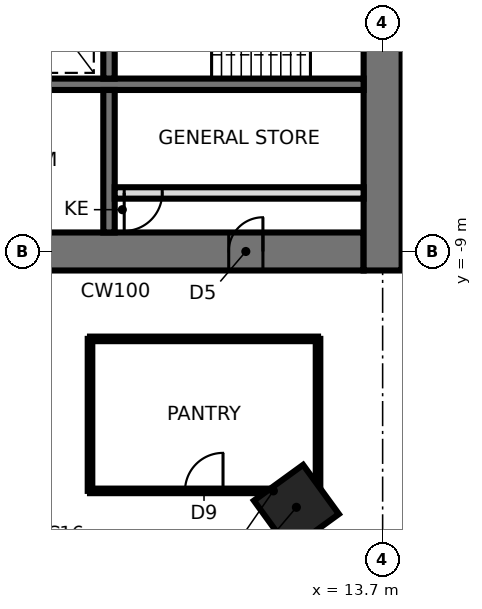
"""IFC4 building model, lengths in metres.
Left out: names, types, materials, properties, quantities, classifications, styles, units other than length and angle.
Written with IfcOpenShell. Run it as: python <this file> out.ifc"""

import sys

from ifc_helpers import new_model, si_unit, direction, frame, frame_2d, origin, origin_2d, place, context, subcontext, project, spatial, rectangle, extrude, element, fill, save


model = new_model("IFC4")
c1 = context("Model", 3, precision=1e-05, world=origin(), true_north=direction((0.0, 1.0)))
c2 = subcontext(c1, "Body", "Model", "MODEL_VIEW")
j1 = project(units=[si_unit("LENGTHUNIT", "METRE"), si_unit("PLANEANGLEUNIT", "RADIAN")], contexts=[c1])
p1 = place(None, origin())
s1 = spatial("IfcSite", under=j1, at=p1, CompositionType="ELEMENT")
p2 = place(p1, origin())
s2 = spatial("IfcBuilding", under=s1, at=p2, CompositionType="ELEMENT")
p3 = place(p2, frame((0.0, 0.0, 135.3)))
s3 = spatial("IfcBuildingStorey", under=s2, at=p3, CompositionType="ELEMENT", Elevation=135.3)
p4 = place(p3, frame((11.43, -15.733, 0.0), z_axis=(0.0, 0.0, 1.0), x_axis=(0.587785252292, -0.809016994375, 0.0)))
e1 = element("IfcColumn", 1, at=p4, inside=s3, PredefinedType="COLUMN", context=c2, shape_type="SweptSolid", body=[
    extrude(rectangle(XDim=1.6, YDim=1.6, at=origin_2d()), origin(), (0.0, 0.0, 1.0), 3.9),
])
p5 = place(p3, frame((-13.2, -9.0, 0.0), z_axis=(0.0, 0.0, 1.0), x_axis=(1.0, 0.0, 0.0)))
e2 = element("IfcWall", 2, at=p5, inside=s3, PredefinedType="SHEAR", context=c2, shape_type="SweptSolid", body=[
    extrude(rectangle(XDim=26.4, YDim=1.0, at=frame_2d((13.2, 0.0))), origin(), (0.0, 0.0, 1.0), 3.9),
])
p6 = place(p5, frame((2.65, 0.0, 0.0)))
e3 = element("IfcOpeningElement", 3, at=p6, cuts=e2, PredefinedType="OPENING", context=c2, shape_type="SweptSolid", body=[
    extrude(rectangle(XDim=0.9, YDim=2.1, at=frame_2d((0.45, 1.05))), frame((0.0, 0.51, 0.0), z_axis=(0.0, -1.0, 0.0), x_axis=(1.0, 0.0, 0.0)), (0.0, 0.0, 1.0), 1.02),
])
p7 = place(p5, frame((9.5, 0.0, 0.0)))
e4 = element("IfcOpeningElement", 4, at=p7, cuts=e2, PredefinedType="OPENING", context=c2, shape_type="SweptSolid", body=[
    extrude(rectangle(XDim=0.9, YDim=2.1, at=frame_2d((0.45, 1.05))), frame((0.0, 0.51, 0.0), z_axis=(0.0, -1.0, 0.0), x_axis=(1.0, 0.0, 0.0)), (0.0, 0.0, 1.0), 1.02),
])
p8 = place(p5, frame((16.0, 0.0, 0.0)))
e5 = element("IfcOpeningElement", 5, at=p8, cuts=e2, PredefinedType="OPENING", context=c2, shape_type="SweptSolid", body=[
    extrude(rectangle(XDim=0.9, YDim=2.1, at=frame_2d((0.45, 1.05))), frame((0.0, 0.51, 0.0), z_axis=(0.0, -1.0, 0.0), x_axis=(1.0, 0.0, 0.0)), (0.0, 0.0, 1.0), 1.02),
])
p9 = place(p5, frame((22.85, 0.0, 0.0)))
e6 = element("IfcOpeningElement", 6, at=p9, cuts=e2, PredefinedType="OPENING", context=c2, shape_type="SweptSolid", body=[
    extrude(rectangle(XDim=0.9, YDim=2.1, at=frame_2d((0.45, 1.05))), frame((0.0, 0.51, 0.0), z_axis=(0.0, -1.0, 0.0), x_axis=(1.0, 0.0, 0.0)), (0.0, 0.0, 1.0), 1.02),
])
p10 = place(p3, frame((13.7, -9.5, 0.0), z_axis=(0.0, 0.0, 1.0), x_axis=(0.0, 1.0, 0.0)))
e7 = element("IfcWall", 7, at=p10, inside=s3, PredefinedType="SHEAR", context=c2, shape_type="SweptSolid", body=[
    extrude(rectangle(XDim=19.0, YDim=1.0, at=frame_2d((9.5, 0.0))), origin(), (0.0, 0.0, 1.0), 3.9),
])
p11 = place(p10, frame((8.6, 0.0, 0.0)))
e8 = element("IfcOpeningElement", 8, at=p11, cuts=e7, PredefinedType="OPENING", context=c2, shape_type="SweptSolid", body=[
    extrude(rectangle(XDim=1.8, YDim=2.4, at=frame_2d((0.9, 1.2))), frame((0.0, 0.51, 0.0), z_axis=(0.0, -1.0, 0.0), x_axis=(1.0, 0.0, 0.0)), (0.0, 0.0, 1.0), 1.02),
])
p12 = place(p3, frame((-13.2, -4.6, 0.0), z_axis=(0.0, 0.0, 1.0), x_axis=(1.0, 0.0, 0.0)))
e9 = element("IfcWall", 9, at=p12, inside=s3, PredefinedType="SHEAR", context=c2, shape_type="SweptSolid", body=[
    extrude(rectangle(XDim=26.4, YDim=0.3, at=frame_2d((13.2, 0.0))), origin(), (0.0, 0.0, 1.0), 3.9),
])
p13 = place(p3, frame((6.5, -1.75, 0.0), z_axis=(0.0, 0.0, 1.0), x_axis=(0.0, -1.0, 0.0)))
e10 = element("IfcWall", 10, at=p13, inside=s3, PredefinedType="SHEAR", context=c2, shape_type="SweptSolid", body=[
    extrude(rectangle(XDim=2.7, YDim=0.3, at=frame_2d((1.35, 0.0))), origin(), (0.0, 0.0, 1.0), 3.9),
])
p14 = place(p3, frame((6.5, -4.75, 0.0), z_axis=(0.0, 0.0, 1.0), x_axis=(0.0, -1.0, 0.0)))
e11 = element("IfcWall", 11, at=p14, inside=s3, PredefinedType="SHEAR", context=c2, shape_type="SweptSolid", body=[
    extrude(rectangle(XDim=3.75, YDim=0.3, at=frame_2d((1.875, 0.0))), origin(), (0.0, 0.0, 1.0), 3.9),
])
p15 = place(p3, frame((6.65, -7.46, 0.0), z_axis=(0.0, 0.0, 1.0), x_axis=(1.0, 0.0, 0.0)))
e12 = element("IfcWall", 12, at=p15, inside=s3, PredefinedType="PARTITIONING", context=c2, shape_type="SweptSolid", body=[
    extrude(rectangle(XDim=6.55, YDim=0.3, at=frame_2d((3.275, 0.0))), origin(), (0.0, 0.0, 1.0), 3.74),
])
p16 = place(p15, frame((0.25, 0.0, 0.0)))
e13 = element("IfcOpeningElement", 13, at=p16, cuts=e12, PredefinedType="OPENING", context=c2, shape_type="SweptSolid", body=[
    extrude(rectangle(XDim=1.0, YDim=2.4, at=frame_2d((0.5, 1.2))), frame((0.0, 0.16, 0.0), z_axis=(0.0, -1.0, 0.0), x_axis=(1.0, 0.0, 0.0)), (0.0, 0.0, 1.0), 0.32),
])
p17 = place(p3, frame((6.0, -15.3, 0.0), z_axis=(0.0, 0.0, 1.0), x_axis=(0.0, 1.0, 0.0)))
e14 = element("IfcWall", 14, at=p17, inside=s3, PredefinedType="PARTITIONING", context=c2, shape_type="SweptSolid", body=[
    extrude(rectangle(XDim=4.0, YDim=0.12, at=frame_2d((2.0, 0.0))), origin(), (0.0, 0.0, 1.0), 3.74),
])
p18 = place(p3, frame((12.0, -15.3, 0.0), z_axis=(0.0, 0.0, 1.0), x_axis=(-1.0, 0.0, 0.0)))
e15 = element("IfcWall", 15, at=p18, inside=s3, PredefinedType="PARTITIONING", context=c2, shape_type="SweptSolid", body=[
    extrude(rectangle(XDim=6.0, YDim=0.12, at=frame_2d((3.0, 0.0))), origin(), (0.0, 0.0, 1.0), 3.74),
])
p19 = place(p18, frame((2.5, 0.0, 0.0)))
e16 = element("IfcOpeningElement", 16, at=p19, cuts=e15, PredefinedType="OPENING", context=c2, shape_type="SweptSolid", body=[
    extrude(rectangle(XDim=1.0, YDim=2.4, at=frame_2d((0.5, 1.2))), frame((0.0, 0.07, 0.0), z_axis=(0.0, -1.0, 0.0), x_axis=(1.0, 0.0, 0.0)), (0.0, 0.0, 1.0), 0.14),
])
p20 = place(p3, frame((6.0, -11.3, 0.0), z_axis=(0.0, 0.0, 1.0), x_axis=(1.0, 0.0, 0.0)))
e17 = element("IfcWall", 17, at=p20, inside=s3, PredefinedType="PARTITIONING", context=c2, shape_type="SweptSolid", body=[
    extrude(rectangle(XDim=6.0, YDim=0.12, at=frame_2d((3.0, 0.0))), origin(), (0.0, 0.0, 1.0), 3.74),
])
p21 = place(p3, frame((12.0, -11.3, 0.0), z_axis=(0.0, 0.0, 1.0), x_axis=(0.0, -1.0, 0.0)))
e18 = element("IfcWall", 18, at=p21, inside=s3, PredefinedType="PARTITIONING", context=c2, shape_type="SweptSolid", body=[
    extrude(rectangle(XDim=4.0, YDim=0.12, at=frame_2d((2.0, 0.0))), origin(), (0.0, 0.0, 1.0), 3.74),
])
p22 = place(p9, origin())
e19 = element("IfcDoor", 19, at=p22, inside=s3, OperationType="SINGLE_SWING_RIGHT", PredefinedType="DOOR", context=c2, shape_type="SweptSolid", body=[
    extrude(rectangle(XDim=0.82, YDim=2.06, at=frame_2d((0.45, 1.03))), frame((0.0, 0.025, 0.0), z_axis=(0.0, -1.0, 0.0), x_axis=(1.0, 0.0, 0.0)), (0.0, 0.0, 1.0), 0.05),
    extrude(rectangle(XDim=0.04, YDim=2.1, at=frame_2d((0.02, 1.05))), frame((0.0, 0.25, 0.0), z_axis=(0.0, -1.0, 0.0), x_axis=(1.0, 0.0, 0.0)), (0.0, 0.0, 1.0), 0.5),
    extrude(rectangle(XDim=0.04, YDim=2.1, at=frame_2d((0.88, 1.05))), frame((0.0, 0.25, 0.0), z_axis=(0.0, -1.0, 0.0), x_axis=(1.0, 0.0, 0.0)), (0.0, 0.0, 1.0), 0.5),
    extrude(rectangle(XDim=0.82, YDim=0.04, at=frame_2d((0.45, 2.08))), frame((0.0, 0.25, 0.0), z_axis=(0.0, -1.0, 0.0), x_axis=(1.0, 0.0, 0.0)), (0.0, 0.0, 1.0), 0.5),
])
fill(e6, e19)
p23 = place(p16, frame((1.0, 0.0, 0.0), z_axis=(0.0, 0.0, 1.0), x_axis=(-1.0, 0.0, 0.0)))
e20 = element("IfcDoor", 20, at=p23, inside=s3, OperationType="SINGLE_SWING_RIGHT", PredefinedType="DOOR", context=c2, shape_type="SweptSolid", body=[
    extrude(rectangle(XDim=1.0, YDim=2.4, at=frame_2d((0.5, 1.2))), frame((0.0, 0.025, 0.0), z_axis=(0.0, -1.0, 0.0), x_axis=(1.0, 0.0, 0.0)), (0.0, 0.0, 1.0), 0.05),
])
fill(e13, e20)
p24 = place(p19, frame((1.0, 0.0, 0.0), z_axis=(0.0, 0.0, 1.0), x_axis=(-1.0, 0.0, 0.0)))
e21 = element("IfcDoor", 21, at=p24, inside=s3, OperationType="SINGLE_SWING_RIGHT", PredefinedType="DOOR", context=c2, shape_type="SweptSolid", body=[
    extrude(rectangle(XDim=1.0, YDim=2.4, at=frame_2d((0.5, 1.2))), frame((0.0, 0.025, 0.0), z_axis=(0.0, -1.0, 0.0), x_axis=(1.0, 0.0, 0.0)), (0.0, 0.0, 1.0), 0.05),
])
fill(e16, e21)
save(model, sys.argv[1])
